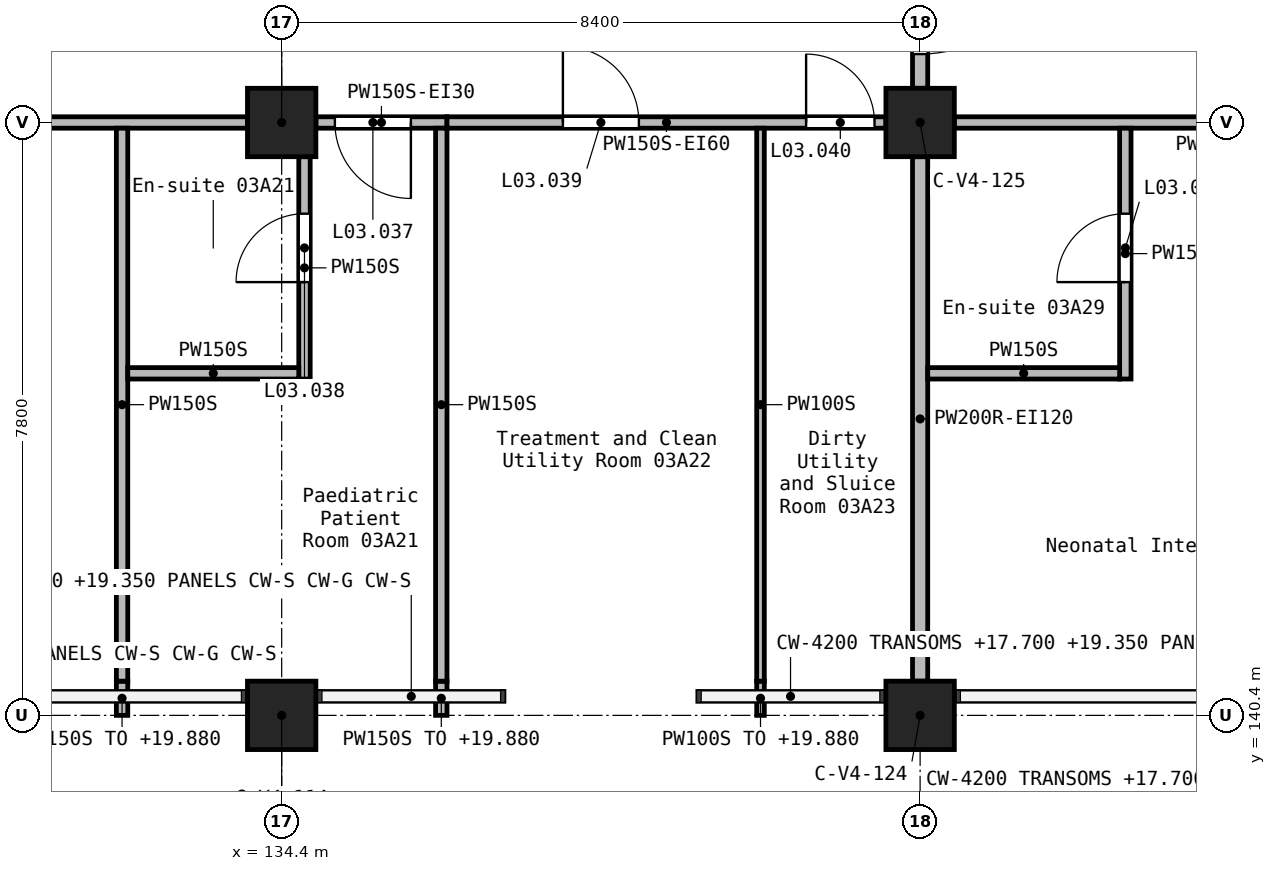
"""IFC4 building model, lengths in metres.
Left out: names, types, materials, properties, quantities, classifications, styles, units other than length and angle.
Written with IfcOpenShell. Run it as: python <this file> out.ifc"""

import sys

from ifc_helpers import new_model, si_unit, direction, frame, frame_2d, origin, origin_2d, place, context, subcontext, project, spatial, rectangle, extrude, element, fill, save


model = new_model("IFC4")
c1 = context("Model", 3, precision=1e-05, world=origin(), true_north=direction((0.0, 1.0)))
c2 = subcontext(c1, "Body", "Model", "MODEL_VIEW")
j1 = project(units=[si_unit("LENGTHUNIT", "METRE"), si_unit("PLANEANGLEUNIT", "RADIAN")], contexts=[c1])
p1 = place(None, origin())
s1 = spatial("IfcSite", under=j1, at=p1, CompositionType="ELEMENT")
p2 = place(p1, origin())
s2 = spatial("IfcBuilding", under=s1, at=p2, CompositionType="ELEMENT")
p3 = place(p2, frame((0.0, 0.0, 16.8)))
s3 = spatial("IfcBuildingStorey", under=s2, at=p3, CompositionType="ELEMENT", Elevation=16.8)
for number, where, z_axis, x_axis in (
    (1, (134.4, 140.4, 0.0), (0.0, 0.0, 1.0), (1.0, 0.0, 0.0)),
    (2, (134.4, 148.2, 0.0), (0.0, 0.0, 1.0), (1.0, 0.0, 0.0)),
    (3, (142.8, 140.4, 0.0), (0.0, 0.0, 1.0), (1.0, 0.0, 0.0)),
    (4, (142.8, 148.2, 0.0), (0.0, 0.0, 1.0), (1.0, 0.0, 0.0)),
):
    element("IfcColumn", number, at=place(p3, frame(where, z_axis=z_axis, x_axis=x_axis)), inside=s3, PredefinedType="COLUMN", context=c2, shape_type="SweptSolid", body=[
        extrude(rectangle(XDim=0.9, YDim=0.9, at=origin_2d()), origin(), (0.0, 0.0, 1.0), 4.2),
    ])
p4 = place(p3, frame((142.8, 151.35, 0.0), z_axis=(0.0, 0.0, 1.0), x_axis=(0.0, -1.0, 0.0)))
e5 = element("IfcWall", 5, at=p4, inside=s3, PredefinedType="SOLIDWALL", context=c2, shape_type="SweptSolid", body=[
    extrude(rectangle(XDim=2.7, YDim=0.2, at=frame_2d((1.35, 0.0))), origin(), (0.0, 0.0, 1.0), 3.9),
])
p5 = place(p4, frame((0.45, 0.0, 0.0)))
e6 = element("IfcOpeningElement", 6, at=p5, cuts=e5, PredefinedType="OPENING", context=c2, shape_type="SweptSolid", body=[
    extrude(rectangle(XDim=1.8, YDim=2.1, at=frame_2d((0.9, 1.05))), frame((0.0, 0.11, 0.0), z_axis=(0.0, -1.0, 0.0), x_axis=(1.0, 0.0, 0.0)), (0.0, 0.0, 1.0), 0.22),
])
p6 = place(p3, frame((142.8, 147.75, 0.0), z_axis=(0.0, 0.0, 1.0), x_axis=(0.0, -1.0, 0.0)))
e7 = element("IfcWall", 7, at=p6, inside=s3, PredefinedType="SOLIDWALL", context=c2, shape_type="SweptSolid", body=[
    extrude(rectangle(XDim=6.9, YDim=0.2, at=frame_2d((3.45, 0.0))), origin(), (0.0, 0.0, 1.0), 3.9),
])
p7 = place(p3, frame((136.575, 148.2, 0.0), z_axis=(0.0, 0.0, 1.0), x_axis=(-1.0, 0.0, 0.0)))
e8 = element("IfcWall", 8, at=p7, inside=s3, PredefinedType="PARTITIONING", context=c2, shape_type="SweptSolid", body=[
    extrude(rectangle(XDim=1.725, YDim=0.15, at=frame_2d((0.862, 0.0))), origin(), (0.0, 0.0, 1.0), 3.9),
])
p8 = place(p7, frame((0.475, 0.0, 0.0)))
e9 = element("IfcOpeningElement", 9, at=p8, cuts=e8, PredefinedType="OPENING", context=c2, shape_type="SweptSolid", body=[
    extrude(rectangle(XDim=1.0, YDim=2.1, at=frame_2d((0.5, 1.05))), frame((0.0, 0.085, 0.0), z_axis=(0.0, -1.0, 0.0), x_axis=(1.0, 0.0, 0.0)), (0.0, 0.0, 1.0), 0.17),
])
p9 = place(p3, frame((133.95, 148.2, 0.0), z_axis=(0.0, 0.0, 1.0), x_axis=(-1.0, 0.0, 0.0)))
e10 = element("IfcWall", 10, at=p9, inside=s3, PredefinedType="PARTITIONING", context=c2, shape_type="SweptSolid", body=[
    extrude(rectangle(XDim=7.5, YDim=0.15, at=frame_2d((3.75, 0.0))), origin(), (0.0, 0.0, 1.0), 3.9),
])
p10 = place(p9, frame((4.0, 0.0, 0.0)))
e11 = element("IfcOpeningElement", 11, at=p10, cuts=e10, PredefinedType="OPENING", context=c2, shape_type="SweptSolid", body=[
    extrude(rectangle(XDim=1.0, YDim=2.1, at=frame_2d((0.5, 1.05))), frame((0.0, 0.085, 0.0), z_axis=(0.0, -1.0, 0.0), x_axis=(1.0, 0.0, 0.0)), (0.0, 0.0, 1.0), 0.17),
])
p11 = place(p3, frame((143.25, 148.2, 0.0), z_axis=(0.0, 0.0, 1.0), x_axis=(1.0, 0.0, 0.0)))
e12 = element("IfcWall", 12, at=p11, inside=s3, PredefinedType="PARTITIONING", context=c2, shape_type="SweptSolid", body=[
    extrude(rectangle(XDim=7.5, YDim=0.15, at=frame_2d((3.75, 0.0))), origin(), (0.0, 0.0, 1.0), 3.9),
])
p12 = place(p11, frame((4.6, 0.0, 0.0)))
e13 = element("IfcOpeningElement", 13, at=p12, cuts=e12, PredefinedType="OPENING", context=c2, shape_type="SweptSolid", body=[
    extrude(rectangle(XDim=1.0, YDim=2.1, at=frame_2d((0.5, 1.05))), frame((0.0, 0.085, 0.0), z_axis=(0.0, -1.0, 0.0), x_axis=(1.0, 0.0, 0.0)), (0.0, 0.0, 1.0), 0.17),
])
p13 = place(p3, frame((136.575, 148.2, 0.0), z_axis=(0.0, 0.0, 1.0), x_axis=(1.0, 0.0, 0.0)))
e14 = element("IfcWall", 14, at=p13, inside=s3, PredefinedType="PARTITIONING", context=c2, shape_type="SweptSolid", body=[
    extrude(rectangle(XDim=5.775, YDim=0.15, at=frame_2d((2.888, 0.0))), origin(), (0.0, 0.0, 1.0), 3.9),
])
p14 = place(p13, frame((1.525, 0.0, 0.0)))
e15 = element("IfcOpeningElement", 15, at=p14, cuts=e14, PredefinedType="OPENING", context=c2, shape_type="SweptSolid", body=[
    extrude(rectangle(XDim=1.0, YDim=2.1, at=frame_2d((0.5, 1.05))), frame((0.0, 0.085, 0.0), z_axis=(0.0, -1.0, 0.0), x_axis=(1.0, 0.0, 0.0)), (0.0, 0.0, 1.0), 0.17),
])
p15 = place(p13, frame((4.725, 0.0, 0.0)))
e16 = element("IfcOpeningElement", 16, at=p15, cuts=e14, PredefinedType="OPENING", context=c2, shape_type="SweptSolid", body=[
    extrude(rectangle(XDim=0.9, YDim=2.1, at=frame_2d((0.45, 1.05))), frame((0.0, 0.085, 0.0), z_axis=(0.0, -1.0, 0.0), x_axis=(1.0, 0.0, 0.0)), (0.0, 0.0, 1.0), 0.17),
])
p16 = place(p3, frame((132.3, 140.4, 0.0), z_axis=(0.0, 0.0, 1.0), x_axis=(0.0, 1.0, 0.0)))
e17 = element("IfcWall", 17, at=p16, inside=s3, PredefinedType="PARTITIONING", context=c2, shape_type="SweptSolid", body=[
    extrude(rectangle(XDim=0.45, YDim=0.15, at=frame_2d((0.225, 0.0))), origin(), (0.0, 0.0, 1.0), 3.08),
])
p17 = place(p3, frame((132.3, 140.85, 0.0), z_axis=(0.0, 0.0, 1.0), x_axis=(0.0, 1.0, 0.0)))
e18 = element("IfcWall", 18, at=p17, inside=s3, PredefinedType="PARTITIONING", context=c2, shape_type="SweptSolid", body=[
    extrude(rectangle(XDim=7.275, YDim=0.15, at=frame_2d((3.637, 0.0))), origin(), (0.0, 0.0, 1.0), 3.9),
])
p18 = place(p3, frame((136.5, 140.4, 0.0), z_axis=(0.0, 0.0, 1.0), x_axis=(0.0, 1.0, 0.0)))
e19 = element("IfcWall", 19, at=p18, inside=s3, PredefinedType="PARTITIONING", context=c2, shape_type="SweptSolid", body=[
    extrude(rectangle(XDim=0.45, YDim=0.15, at=frame_2d((0.225, 0.0))), origin(), (0.0, 0.0, 1.0), 3.08),
])
p19 = place(p3, frame((136.5, 140.85, 0.0), z_axis=(0.0, 0.0, 1.0), x_axis=(0.0, 1.0, 0.0)))
e20 = element("IfcWall", 20, at=p19, inside=s3, PredefinedType="PARTITIONING", context=c2, shape_type="SweptSolid", body=[
    extrude(rectangle(XDim=7.275, YDim=0.15, at=frame_2d((3.637, 0.0))), origin(), (0.0, 0.0, 1.0), 3.9),
])
p20 = place(p3, frame((134.7, 144.825, 0.0), z_axis=(0.0, 0.0, 1.0), x_axis=(0.0, 1.0, 0.0)))
e21 = element("IfcWall", 21, at=p20, inside=s3, PredefinedType="PARTITIONING", context=c2, shape_type="SweptSolid", body=[
    extrude(rectangle(XDim=2.925, YDim=0.15, at=frame_2d((1.462, 0.0))), origin(), (0.0, 0.0, 1.0), 3.9),
])
p21 = place(p20, frame((1.275, 0.0, 0.0)))
e22 = element("IfcOpeningElement", 22, at=p21, cuts=e21, PredefinedType="OPENING", context=c2, shape_type="SweptSolid", body=[
    extrude(rectangle(XDim=0.9, YDim=2.1, at=frame_2d((0.45, 1.05))), frame((0.0, 0.085, 0.0), z_axis=(0.0, -1.0, 0.0), x_axis=(1.0, 0.0, 0.0)), (0.0, 0.0, 1.0), 0.17),
])
p22 = place(p3, frame((145.5, 144.825, 0.0), z_axis=(0.0, 0.0, 1.0), x_axis=(0.0, 1.0, 0.0)))
e23 = element("IfcWall", 23, at=p22, inside=s3, PredefinedType="PARTITIONING", context=c2, shape_type="SweptSolid", body=[
    extrude(rectangle(XDim=3.3, YDim=0.15, at=frame_2d((1.65, 0.0))), origin(), (0.0, 0.0, 1.0), 3.9),
])
p23 = place(p22, frame((1.275, 0.0, 0.0)))
e24 = element("IfcOpeningElement", 24, at=p23, cuts=e23, PredefinedType="OPENING", context=c2, shape_type="SweptSolid", body=[
    extrude(rectangle(XDim=0.9, YDim=2.1, at=frame_2d((0.45, 1.05))), frame((0.0, 0.085, 0.0), z_axis=(0.0, -1.0, 0.0), x_axis=(1.0, 0.0, 0.0)), (0.0, 0.0, 1.0), 0.17),
])
p24 = place(p3, frame((142.9, 144.9, 0.0), z_axis=(0.0, 0.0, 1.0), x_axis=(1.0, 0.0, 0.0)))
e25 = element("IfcWall", 25, at=p24, inside=s3, PredefinedType="PARTITIONING", context=c2, shape_type="SweptSolid", body=[
    extrude(rectangle(XDim=2.525, YDim=0.15, at=frame_2d((1.263, 0.0))), origin(), (0.0, 0.0, 1.0), 3.9),
])
p25 = place(p3, frame((132.375, 144.9, 0.0), z_axis=(0.0, 0.0, 1.0), x_axis=(1.0, 0.0, 0.0)))
e26 = element("IfcWall", 26, at=p25, inside=s3, PredefinedType="PARTITIONING", context=c2, shape_type="SweptSolid", body=[
    extrude(rectangle(XDim=2.25, YDim=0.15, at=frame_2d((1.125, 0.0))), origin(), (0.0, 0.0, 1.0), 3.9),
])
p26 = place(p3, frame((140.7, 140.4, 0.0), z_axis=(0.0, 0.0, 1.0), x_axis=(0.0, 1.0, 0.0)))
e27 = element("IfcWall", 27, at=p26, inside=s3, PredefinedType="PARTITIONING", context=c2, shape_type="SweptSolid", body=[
    extrude(rectangle(XDim=0.45, YDim=0.1, at=frame_2d((0.225, 0.0))), origin(), (0.0, 0.0, 1.0), 3.08),
])
p27 = place(p3, frame((140.7, 140.85, 0.0), z_axis=(0.0, 0.0, 1.0), x_axis=(0.0, 1.0, 0.0)))
e28 = element("IfcWall", 28, at=p27, inside=s3, PredefinedType="PARTITIONING", context=c2, shape_type="SweptSolid", body=[
    extrude(rectangle(XDim=7.275, YDim=0.1, at=frame_2d((3.637, 0.0))), origin(), (0.0, 0.0, 1.0), 3.9),
])
p28 = place(p5, origin())
e29 = element("IfcDoor", 29, at=p28, inside=s3, OperationType="DOUBLE_DOOR_SINGLE_SWING", PredefinedType="DOOR", context=c2, shape_type="SweptSolid", body=[
    extrude(rectangle(XDim=1.8, YDim=2.1, at=frame_2d((0.9, 1.05))), frame((0.0, 0.025, 0.0), z_axis=(0.0, -1.0, 0.0), x_axis=(1.0, 0.0, 0.0)), (0.0, 0.0, 1.0), 0.05),
])
fill(e6, e29)
p29 = place(p8, origin())
e30 = element("IfcDoor", 30, at=p29, inside=s3, OperationType="SINGLE_SWING_RIGHT", PredefinedType="DOOR", context=c2, shape_type="SweptSolid", body=[
    extrude(rectangle(XDim=1.0, YDim=2.1, at=frame_2d((0.5, 1.05))), frame((0.0, 0.025, 0.0), z_axis=(0.0, -1.0, 0.0), x_axis=(1.0, 0.0, 0.0)), (0.0, 0.0, 1.0), 0.05),
])
fill(e9, e30)
p30 = place(p21, origin())
e31 = element("IfcDoor", 31, at=p30, inside=s3, OperationType="SINGLE_SWING_RIGHT", PredefinedType="DOOR", context=c2, shape_type="SweptSolid", body=[
    extrude(rectangle(XDim=0.9, YDim=2.1, at=frame_2d((0.45, 1.05))), frame((0.0, 0.025, 0.0), z_axis=(0.0, -1.0, 0.0), x_axis=(1.0, 0.0, 0.0)), (0.0, 0.0, 1.0), 0.05),
])
fill(e22, e31)
p31 = place(p14, frame((1.0, 0.0, 0.0), z_axis=(0.0, 0.0, 1.0), x_axis=(-1.0, 0.0, 0.0)))
e32 = element("IfcDoor", 32, at=p31, inside=s3, OperationType="SINGLE_SWING_RIGHT", PredefinedType="DOOR", context=c2, shape_type="SweptSolid", body=[
    extrude(rectangle(XDim=1.0, YDim=2.1, at=frame_2d((0.5, 1.05))), frame((0.0, 0.025, 0.0), z_axis=(0.0, -1.0, 0.0), x_axis=(1.0, 0.0, 0.0)), (0.0, 0.0, 1.0), 0.05),
])
fill(e15, e32)
p32 = place(p15, frame((0.9, 0.0, 0.0), z_axis=(0.0, 0.0, 1.0), x_axis=(-1.0, 0.0, 0.0)))
e33 = element("IfcDoor", 33, at=p32, inside=s3, OperationType="SINGLE_SWING_LEFT", PredefinedType="DOOR", context=c2, shape_type="SweptSolid", body=[
    extrude(rectangle(XDim=0.9, YDim=2.1, at=frame_2d((0.45, 1.05))), frame((0.0, 0.025, 0.0), z_axis=(0.0, -1.0, 0.0), x_axis=(1.0, 0.0, 0.0)), (0.0, 0.0, 1.0), 0.05),
])
fill(e16, e33)
p33 = place(p23, origin())
e34 = element("IfcDoor", 34, at=p33, inside=s3, OperationType="SINGLE_SWING_RIGHT", PredefinedType="DOOR", context=c2, shape_type="SweptSolid", body=[
    extrude(rectangle(XDim=0.9, YDim=2.1, at=frame_2d((0.45, 1.05))), frame((0.0, 0.025, 0.0), z_axis=(0.0, -1.0, 0.0), x_axis=(1.0, 0.0, 0.0)), (0.0, 0.0, 1.0), 0.05),
])
fill(e24, e34)
save(model, sys.argv[1])
